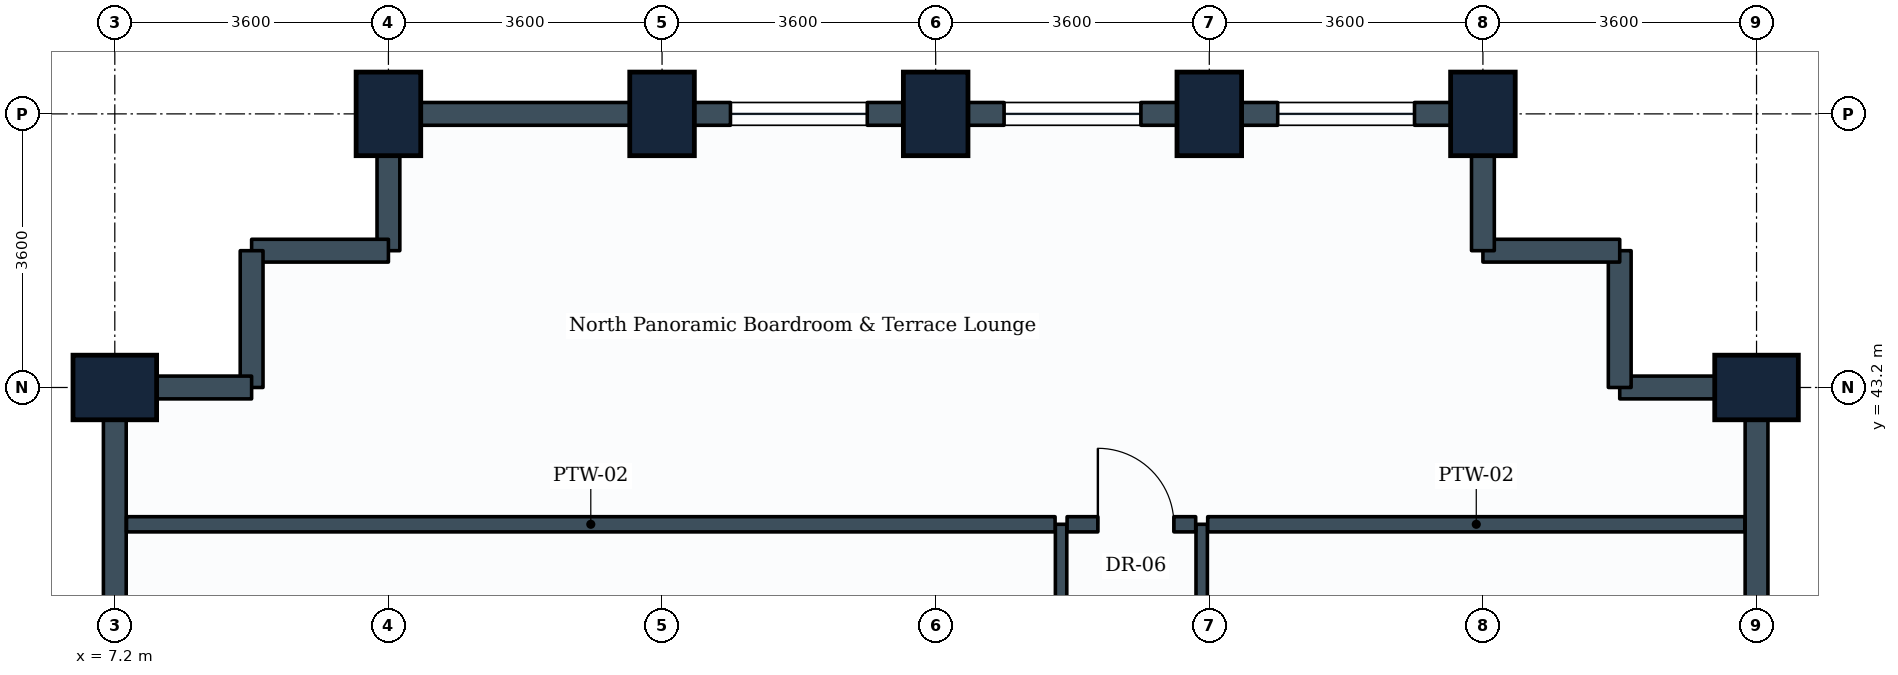
"""IFC4 building model, lengths in metres.
Left out: names, types, materials, properties, quantities, classifications, styles, units other than length and angle.
Written with IfcOpenShell. Run it as: python <this file> out.ifc"""

import sys

from ifc_helpers import new_model, si_unit, direction, frame, frame_2d, origin, origin_2d, place, context, subcontext, project, spatial, rectangle, extrude, element, fill, save


model = new_model("IFC4")
c1 = context("Model", 3, precision=1e-05, world=origin(), true_north=direction((0.0, 1.0)))
c2 = subcontext(c1, "Body", "Model", "MODEL_VIEW")
j1 = project(units=[si_unit("LENGTHUNIT", "METRE"), si_unit("PLANEANGLEUNIT", "RADIAN")], contexts=[c1])
p1 = place(None, origin())
s1 = spatial("IfcSite", under=j1, at=p1, CompositionType="ELEMENT")
p2 = place(p1, origin())
s2 = spatial("IfcBuilding", under=s1, at=p2, CompositionType="ELEMENT")
p3 = place(p2, frame((0.0, 0.0, 95.7)))
s3 = spatial("IfcBuildingStorey", under=s2, at=p3, CompositionType="ELEMENT", Elevation=95.7)
for number, where, z_axis, x_axis in (
    (1, (7.2, 43.2, 0.0), (0.0, 0.0, 1.0), (0.0, 1.0, 0.0)),
    (2, (10.8, 46.8, 0.0), (0.0, 0.0, 1.0), (1.0, 0.0, 0.0)),
    (3, (14.4, 46.8, 0.0), (0.0, 0.0, 1.0), (1.0, 0.0, 0.0)),
    (4, (18.0, 46.8, 0.0), (0.0, 0.0, 1.0), (1.0, 0.0, 0.0)),
    (5, (21.6, 46.8, 0.0), (0.0, 0.0, 1.0), (1.0, 0.0, 0.0)),
    (6, (25.2, 46.8, 0.0), (0.0, 0.0, 1.0), (1.0, 0.0, 0.0)),
    (7, (28.8, 43.2, 0.0), (0.0, 0.0, 1.0), (0.0, 1.0, 0.0)),
):
    element("IfcColumn", number, at=place(p3, frame(where, z_axis=z_axis, x_axis=x_axis)), inside=s3, PredefinedType="COLUMN", context=c2, shape_type="SweptSolid", body=[
        extrude(rectangle(XDim=0.85, YDim=1.1, at=origin_2d()), origin(), (0.0, 0.0, 1.0), 3.9),
    ])
p4 = place(p3, frame((28.8, 43.2, 0.0), z_axis=(0.0, 0.0, 1.0), x_axis=(0.0, -1.0, 0.0)))
e8 = element("IfcWall", 8, at=p4, inside=s3, PredefinedType="STANDARD", context=c2, shape_type="SweptSolid", body=[
    extrude(rectangle(XDim=3.6, YDim=0.3, at=frame_2d((1.8, 0.0))), origin(), (0.0, 0.0, 1.0), 2.93),
])
p5 = place(p3, frame((27.0, 43.2, 0.0), z_axis=(0.0, 0.0, 1.0), x_axis=(1.0, 0.0, 0.0)))
e9 = element("IfcWall", 9, at=p5, inside=s3, PredefinedType="STANDARD", context=c2, shape_type="SweptSolid", body=[
    extrude(rectangle(XDim=1.8, YDim=0.3, at=frame_2d((0.9, 0.0))), origin(), (0.0, 0.0, 1.0), 2.93),
])
for number, where, z_axis, x_axis in (
    (10, (27.0, 43.2, 0.0), (0.0, 0.0, 1.0), (0.0, 1.0, 0.0)),
    (11, (25.2, 45.0, 0.0), (0.0, 0.0, 1.0), (1.0, 0.0, 0.0)),
):
    element("IfcWall", number, at=place(p3, frame(where, z_axis=z_axis, x_axis=x_axis)), inside=s3, PredefinedType="STANDARD", context=c2, shape_type="SweptSolid", body=[
        extrude(rectangle(XDim=1.8, YDim=0.3, at=frame_2d((0.9, 0.0))), origin(), (0.0, 0.0, 1.0), 3.635),
    ])
p6 = place(p3, frame((25.2, 45.0, 0.0), z_axis=(0.0, 0.0, 1.0), x_axis=(0.0, 1.0, 0.0)))
e12 = element("IfcWall", 12, at=p6, inside=s3, PredefinedType="STANDARD", context=c2, shape_type="SweptSolid", body=[
    extrude(rectangle(XDim=1.8, YDim=0.3, at=frame_2d((0.9, 0.0))), origin(), (0.0, 0.0, 1.0), 2.93),
])
p7 = place(p3, frame((21.6, 46.8, 0.0), z_axis=(0.0, 0.0, 1.0), x_axis=(1.0, 0.0, 0.0)))
e13 = element("IfcWall", 13, at=p7, inside=s3, PredefinedType="STANDARD", context=c2, shape_type="SweptSolid", body=[
    extrude(rectangle(XDim=3.6, YDim=0.3, at=frame_2d((1.8, 0.0))), origin(), (0.0, 0.0, 1.0), 2.93),
])
p8 = place(p7, frame((0.9, 0.0, 0.85)))
e14 = element("IfcOpeningElement", 14, at=p8, cuts=e13, PredefinedType="OPENING", context=c2, shape_type="SweptSolid", body=[
    extrude(rectangle(XDim=1.8, YDim=1.35, at=frame_2d((0.9, 0.675))), frame((0.0, 0.16, 0.0), z_axis=(0.0, -1.0, 0.0), x_axis=(1.0, 0.0, 0.0)), (0.0, 0.0, 1.0), 0.32),
])
p9 = place(p3, frame((18.0, 46.8, 0.0), z_axis=(0.0, 0.0, 1.0), x_axis=(1.0, 0.0, 0.0)))
e15 = element("IfcWall", 15, at=p9, inside=s3, PredefinedType="STANDARD", context=c2, shape_type="SweptSolid", body=[
    extrude(rectangle(XDim=3.6, YDim=0.3, at=frame_2d((1.8, 0.0))), origin(), (0.0, 0.0, 1.0), 2.93),
])
p10 = place(p9, frame((0.9, 0.0, 0.85)))
e16 = element("IfcOpeningElement", 16, at=p10, cuts=e15, PredefinedType="OPENING", context=c2, shape_type="SweptSolid", body=[
    extrude(rectangle(XDim=1.8, YDim=1.35, at=frame_2d((0.9, 0.675))), frame((0.0, 0.16, 0.0), z_axis=(0.0, -1.0, 0.0), x_axis=(1.0, 0.0, 0.0)), (0.0, 0.0, 1.0), 0.32),
])
p11 = place(p3, frame((14.4, 46.8, 0.0), z_axis=(0.0, 0.0, 1.0), x_axis=(1.0, 0.0, 0.0)))
e17 = element("IfcWall", 17, at=p11, inside=s3, PredefinedType="STANDARD", context=c2, shape_type="SweptSolid", body=[
    extrude(rectangle(XDim=3.6, YDim=0.3, at=frame_2d((1.8, 0.0))), origin(), (0.0, 0.0, 1.0), 2.93),
])
p12 = place(p11, frame((0.9, 0.0, 0.85)))
e18 = element("IfcOpeningElement", 18, at=p12, cuts=e17, PredefinedType="OPENING", context=c2, shape_type="SweptSolid", body=[
    extrude(rectangle(XDim=1.8, YDim=1.35, at=frame_2d((0.9, 0.675))), frame((0.0, 0.16, 0.0), z_axis=(0.0, -1.0, 0.0), x_axis=(1.0, 0.0, 0.0)), (0.0, 0.0, 1.0), 0.32),
])
p13 = place(p3, frame((10.8, 46.8, 0.0), z_axis=(0.0, 0.0, 1.0), x_axis=(1.0, 0.0, 0.0)))
e19 = element("IfcWall", 19, at=p13, inside=s3, PredefinedType="STANDARD", context=c2, shape_type="SweptSolid", body=[
    extrude(rectangle(XDim=3.6, YDim=0.3, at=frame_2d((1.8, 0.0))), origin(), (0.0, 0.0, 1.0), 2.93),
])
p14 = place(p3, frame((10.8, 45.0, 0.0), z_axis=(0.0, 0.0, 1.0), x_axis=(0.0, 1.0, 0.0)))
e20 = element("IfcWall", 20, at=p14, inside=s3, PredefinedType="STANDARD", context=c2, shape_type="SweptSolid", body=[
    extrude(rectangle(XDim=1.8, YDim=0.3, at=frame_2d((0.9, 0.0))), origin(), (0.0, 0.0, 1.0), 2.93),
])
for number, where, z_axis, x_axis in (
    (21, (9.0, 45.0, 0.0), (0.0, 0.0, 1.0), (1.0, 0.0, 0.0)),
    (22, (9.0, 43.2, 0.0), (0.0, 0.0, 1.0), (0.0, 1.0, 0.0)),
):
    element("IfcWall", number, at=place(p3, frame(where, z_axis=z_axis, x_axis=x_axis)), inside=s3, PredefinedType="STANDARD", context=c2, shape_type="SweptSolid", body=[
        extrude(rectangle(XDim=1.8, YDim=0.3, at=frame_2d((0.9, 0.0))), origin(), (0.0, 0.0, 1.0), 3.635),
    ])
p15 = place(p3, frame((7.2, 43.2, 0.0), z_axis=(0.0, 0.0, 1.0), x_axis=(1.0, 0.0, 0.0)))
e23 = element("IfcWall", 23, at=p15, inside=s3, PredefinedType="STANDARD", context=c2, shape_type="SweptSolid", body=[
    extrude(rectangle(XDim=1.8, YDim=0.3, at=frame_2d((0.9, 0.0))), origin(), (0.0, 0.0, 1.0), 2.93),
])
p16 = place(p3, frame((7.2, 39.6, 0.0), z_axis=(0.0, 0.0, 1.0), x_axis=(0.0, 1.0, 0.0)))
e24 = element("IfcWall", 24, at=p16, inside=s3, PredefinedType="STANDARD", context=c2, shape_type="SweptSolid", body=[
    extrude(rectangle(XDim=3.6, YDim=0.3, at=frame_2d((1.8, 0.0))), origin(), (0.0, 0.0, 1.0), 2.93),
])
p17 = place(p3, frame((19.65, 34.469, 0.0), z_axis=(0.0, 0.0, 1.0), x_axis=(0.0, 1.0, 0.0)))
e25 = element("IfcWall", 25, at=p17, inside=s3, PredefinedType="PARTITIONING", context=c2, shape_type="SweptSolid", body=[
    extrude(rectangle(XDim=6.931, YDim=0.15, at=frame_2d((3.465, 0.0))), origin(), (0.0, 0.0, 1.0), 3.19),
])
p18 = place(p17, frame((1.386, 0.0, 0.0)))
e26 = element("IfcOpeningElement", 26, at=p18, cuts=e25, PredefinedType="OPENING", context=c2, shape_type="SweptSolid", body=[
    extrude(rectangle(XDim=1.0, YDim=2.1, at=frame_2d((0.5, 1.05))), frame((0.0, 0.085, 0.0), z_axis=(0.0, -1.0, 0.0), x_axis=(1.0, 0.0, 0.0)), (0.0, 0.0, 1.0), 0.17),
])
p19 = place(p3, frame((21.5, 34.329, 0.0), z_axis=(0.0, 0.0, 1.0), x_axis=(0.0, 1.0, 0.0)))
e27 = element("IfcWall", 27, at=p19, inside=s3, PredefinedType="PARTITIONING", context=c2, shape_type="SweptSolid", body=[
    extrude(rectangle(XDim=7.071, YDim=0.15, at=frame_2d((3.535, 0.0))), origin(), (0.0, 0.0, 1.0), 3.18),
])
p20 = place(p19, frame((2.996, 0.0, 0.0)))
e28 = element("IfcOpeningElement", 28, at=p20, cuts=e27, PredefinedType="OPENING", context=c2, shape_type="SweptSolid", body=[
    extrude(rectangle(XDim=1.0, YDim=2.1, at=frame_2d((0.5, 1.05))), frame((0.0, 0.085, 0.0), z_axis=(0.0, -1.0, 0.0), x_axis=(1.0, 0.0, 0.0)), (0.0, 0.0, 1.0), 0.17),
])
p21 = place(p3, frame((7.354, 41.4, 0.0), z_axis=(0.0, 0.0, 1.0), x_axis=(1.0, 0.0, 0.0)))
e29 = element("IfcWall", 29, at=p21, inside=s3, PredefinedType="PARTITIONING", context=c2, shape_type="SweptSolid", body=[
    extrude(rectangle(XDim=12.217, YDim=0.2, at=frame_2d((6.108, 0.0))), origin(), (0.0, 0.0, 1.0), 2.93),
])
p22 = place(p3, frame((21.579, 41.4, 0.0), z_axis=(0.0, 0.0, 1.0), x_axis=(1.0, 0.0, 0.0)))
e30 = element("IfcWall", 30, at=p22, inside=s3, PredefinedType="PARTITIONING", context=c2, shape_type="SweptSolid", body=[
    extrude(rectangle(XDim=7.067, YDim=0.2, at=frame_2d((3.533, 0.0))), origin(), (0.0, 0.0, 1.0), 2.93),
])
p23 = place(p3, frame((19.729, 41.4, 0.0), z_axis=(0.0, 0.0, 1.0), x_axis=(1.0, 0.0, 0.0)))
e31 = element("IfcWall", 31, at=p23, inside=s3, PredefinedType="PARTITIONING", context=c2, shape_type="SweptSolid", body=[
    extrude(rectangle(XDim=1.692, YDim=0.2, at=frame_2d((0.846, 0.0))), origin(), (0.0, 0.0, 1.0), 3.635),
])
p24 = place(p23, frame((0.405, 0.0, 0.0)))
e32 = element("IfcOpeningElement", 32, at=p24, cuts=e31, PredefinedType="OPENING", context=c2, shape_type="SweptSolid", body=[
    extrude(rectangle(XDim=1.0, YDim=2.1, at=frame_2d((0.5, 1.05))), frame((0.0, 0.11, 0.0), z_axis=(0.0, -1.0, 0.0), x_axis=(1.0, 0.0, 0.0)), (0.0, 0.0, 1.0), 0.22),
])
p25 = place(p8, origin())
e33 = element("IfcWindow", 33, at=p25, inside=s3, PartitioningType="SINGLE_PANEL", PredefinedType="WINDOW", context=c2, shape_type="SweptSolid", body=[
    extrude(rectangle(XDim=1.8, YDim=1.35, at=frame_2d((0.9, 0.675))), frame((0.0, 0.03, 0.0), z_axis=(0.0, -1.0, 0.0), x_axis=(1.0, 0.0, 0.0)), (0.0, 0.0, 1.0), 0.06),
])
fill(e14, e33)
p26 = place(p10, origin())
e34 = element("IfcWindow", 34, at=p26, inside=s3, PartitioningType="SINGLE_PANEL", PredefinedType="WINDOW", context=c2, shape_type="SweptSolid", body=[
    extrude(rectangle(XDim=1.8, YDim=1.35, at=frame_2d((0.9, 0.675))), frame((0.0, 0.03, 0.0), z_axis=(0.0, -1.0, 0.0), x_axis=(1.0, 0.0, 0.0)), (0.0, 0.0, 1.0), 0.06),
])
fill(e16, e34)
p27 = place(p12, origin())
e35 = element("IfcWindow", 35, at=p27, inside=s3, PartitioningType="SINGLE_PANEL", PredefinedType="WINDOW", context=c2, shape_type="SweptSolid", body=[
    extrude(rectangle(XDim=1.8, YDim=1.35, at=frame_2d((0.9, 0.675))), frame((0.0, 0.03, 0.0), z_axis=(0.0, -1.0, 0.0), x_axis=(1.0, 0.0, 0.0)), (0.0, 0.0, 1.0), 0.06),
])
fill(e18, e35)
p28 = place(p24, origin())
e36 = element("IfcDoor", 36, at=p28, inside=s3, OperationType="SINGLE_SWING_LEFT", PredefinedType="DOOR", context=c2, shape_type="SweptSolid", body=[
    extrude(rectangle(XDim=1.0, YDim=2.1, at=frame_2d((0.5, 1.05))), frame((0.0, 0.025, 0.0), z_axis=(0.0, -1.0, 0.0), x_axis=(1.0, 0.0, 0.0)), (0.0, 0.0, 1.0), 0.05),
])
fill(e32, e36)
save(model, sys.argv[1])
